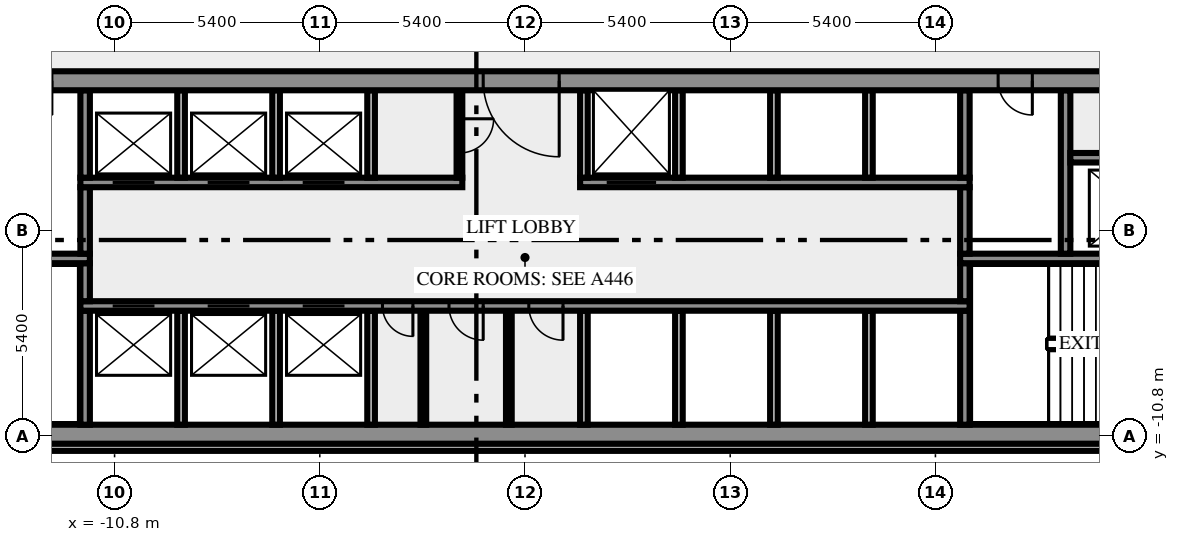
"""IFC4 building model, lengths in metres.
Left out: names, types, materials, properties, quantities, classifications, styles, units other than length and angle.
Written with IfcOpenShell. Run it as: python <this file> out.ifc"""

import sys

from ifc_helpers import new_model, si_unit, direction, frame, frame_2d, origin, place, context, subcontext, project, spatial, rectangle, extrude, element, fill, save


model = new_model("IFC4")
c1 = context("Model", 3, precision=1e-05, world=origin(), true_north=direction((0.0, 1.0)))
c2 = subcontext(c1, "Body", "Model", "MODEL_VIEW")
j1 = project(units=[si_unit("LENGTHUNIT", "METRE"), si_unit("PLANEANGLEUNIT", "RADIAN")], contexts=[c1])
p1 = place(None, origin())
s1 = spatial("IfcSite", under=j1, at=p1, CompositionType="ELEMENT")
p2 = place(p1, origin())
s2 = spatial("IfcBuilding", under=s1, at=p2, CompositionType="ELEMENT")
p3 = place(p2, frame((0.0, 0.0, 6.0)))
s3 = spatial("IfcBuildingStorey", under=s2, at=p3, CompositionType="ELEMENT", Elevation=6.0)
p4 = place(p3, frame((-17.444, -11.088, 0.0), z_axis=(0.0, 0.0, 1.0), x_axis=(1.0, 0.0, 0.0)))
e1 = element("IfcWall", 1, at=p4, inside=s3, PredefinedType="SOLIDWALL", context=c2, shape_type="SweptSolid", body=[
    extrude(rectangle(XDim=34.888, YDim=0.2, at=frame_2d((17.444, 0.0))), origin(), (0.0, 0.0, 1.0), 5.1),
])
p5 = place(p3, frame((-20.0, -10.75, 0.0), z_axis=(0.0, 0.0, 1.0), x_axis=(1.0, 0.0, 0.0)))
e2 = element("IfcWall", 2, at=p5, inside=s3, PredefinedType="SHEAR", context=c2, shape_type="SweptSolid", body=[
    extrude(rectangle(XDim=40.0, YDim=0.5, at=frame_2d((20.0, 0.0))), origin(), (0.0, 0.0, 1.0), 5.1),
])
p6 = place(p5, frame((0.8, 0.0, 1.0)))
e3 = element("IfcOpeningElement", 3, at=p6, cuts=e2, PredefinedType="OPENING", context=c2, shape_type="SweptSolid", body=[
    extrude(rectangle(XDim=1.2, YDim=1.2, at=frame_2d((0.6, 0.6))), frame((0.0, 0.26, 0.0), z_axis=(0.0, -1.0, 0.0), x_axis=(1.0, 0.0, 0.0)), (0.0, 0.0, 1.0), 0.52),
])
p7 = place(p5, frame((38.0, 0.0, 1.0)))
e4 = element("IfcOpeningElement", 4, at=p7, cuts=e2, PredefinedType="OPENING", context=c2, shape_type="SweptSolid", body=[
    extrude(rectangle(XDim=1.2, YDim=1.2, at=frame_2d((0.6, 0.6))), frame((0.0, 0.26, 0.0), z_axis=(0.0, -1.0, 0.0), x_axis=(1.0, 0.0, 0.0)), (0.0, 0.0, 1.0), 0.52),
])
p8 = place(p3, frame((-11.575, -10.5, 0.0), z_axis=(0.0, 0.0, 1.0), x_axis=(0.0, 1.0, 0.0)))
e5 = element("IfcWall", 5, at=p8, inside=s3, PredefinedType="SHEAR", context=c2, shape_type="SweptSolid", body=[
    extrude(rectangle(XDim=3.0, YDim=0.25, at=frame_2d((1.5, 0.0))), origin(), (0.0, 0.0, 1.0), 5.1),
])
for number, where, z_axis, x_axis in (
    (6, (-9.05, -10.5, 0.0), (0.0, 0.0, 1.0), (0.0, 1.0, 0.0)),
    (7, (-6.55, -10.5, 0.0), (0.0, 0.0, 1.0), (0.0, 1.0, 0.0)),
    (8, (-4.05, -10.5, 0.0), (0.0, 0.0, 1.0), (0.0, 1.0, 0.0)),
):
    element("IfcWall", number, at=place(p3, frame(where, z_axis=z_axis, x_axis=x_axis)), inside=s3, PredefinedType="SOLIDWALL", context=c2, shape_type="SweptSolid", body=[
        extrude(rectangle(XDim=3.0, YDim=0.2, at=frame_2d((1.5, 0.0))), origin(), (0.0, 0.0, 1.0), 5.1),
    ])
for number, where, z_axis, x_axis in (
    (9, (-2.675, -10.5, 0.0), (0.0, 0.0, 1.0), (0.0, 1.0, 0.0)),
    (10, (-0.425, -10.5, 0.0), (0.0, 0.0, 1.0), (0.0, 1.0, 0.0)),
):
    element("IfcWall", number, at=place(p3, frame(where, z_axis=z_axis, x_axis=x_axis)), inside=s3, PredefinedType="PARTITIONING", context=c2, shape_type="SweptSolid", body=[
        extrude(rectangle(XDim=3.0, YDim=0.15, at=frame_2d((1.5, 0.0))), origin(), (0.0, 0.0, 1.0), 5.1),
    ])
for number, where, z_axis, x_axis in (
    (11, (1.55, -10.5, 0.0), (0.0, 0.0, 1.0), (0.0, 1.0, 0.0)),
    (12, (4.05, -10.5, 0.0), (0.0, 0.0, 1.0), (0.0, 1.0, 0.0)),
    (13, (6.55, -10.5, 0.0), (0.0, 0.0, 1.0), (0.0, 1.0, 0.0)),
    (14, (9.05, -10.5, 0.0), (0.0, 0.0, 1.0), (0.0, 1.0, 0.0)),
):
    element("IfcWall", number, at=place(p3, frame(where, z_axis=z_axis, x_axis=x_axis)), inside=s3, PredefinedType="SOLIDWALL", context=c2, shape_type="SweptSolid", body=[
        extrude(rectangle(XDim=3.0, YDim=0.2, at=frame_2d((1.5, 0.0))), origin(), (0.0, 0.0, 1.0), 5.1),
    ])
p9 = place(p3, frame((11.575, -10.5, 0.0), z_axis=(0.0, 0.0, 1.0), x_axis=(0.0, 1.0, 0.0)))
e15 = element("IfcWall", 15, at=p9, inside=s3, PredefinedType="SHEAR", context=c2, shape_type="SweptSolid", body=[
    extrude(rectangle(XDim=3.0, YDim=0.25, at=frame_2d((1.5, 0.0))), origin(), (0.0, 0.0, 1.0), 5.1),
])
p10 = place(p3, frame((11.7, -7.375, 0.0), z_axis=(0.0, 0.0, 1.0), x_axis=(-1.0, 0.0, 0.0)))
e16 = element("IfcWall", 16, at=p10, inside=s3, PredefinedType="SHEAR", context=c2, shape_type="SweptSolid", body=[
    extrude(rectangle(XDim=23.4, YDim=0.25, at=frame_2d((11.7, 0.0))), origin(), (0.0, 0.0, 1.0), 5.1),
])
p11 = place(p10, frame((21.45, 0.0, 0.0)))
e17 = element("IfcOpeningElement", 17, at=p11, cuts=e16, PredefinedType="OPENING", context=c2, shape_type="SweptSolid", body=[
    extrude(rectangle(XDim=1.1, YDim=2.1, at=frame_2d((0.55, 1.05))), frame((0.0, 0.135, 0.0), z_axis=(0.0, -1.0, 0.0), x_axis=(1.0, 0.0, 0.0)), (0.0, 0.0, 1.0), 0.27),
])
p12 = place(p10, frame((18.95, 0.0, 0.0)))
e18 = element("IfcOpeningElement", 18, at=p12, cuts=e16, PredefinedType="OPENING", context=c2, shape_type="SweptSolid", body=[
    extrude(rectangle(XDim=1.1, YDim=2.1, at=frame_2d((0.55, 1.05))), frame((0.0, 0.135, 0.0), z_axis=(0.0, -1.0, 0.0), x_axis=(1.0, 0.0, 0.0)), (0.0, 0.0, 1.0), 0.27),
])
p13 = place(p10, frame((16.45, 0.0, 0.0)))
e19 = element("IfcOpeningElement", 19, at=p13, cuts=e16, PredefinedType="OPENING", context=c2, shape_type="SweptSolid", body=[
    extrude(rectangle(XDim=1.1, YDim=2.1, at=frame_2d((0.55, 1.05))), frame((0.0, 0.135, 0.0), z_axis=(0.0, -1.0, 0.0), x_axis=(1.0, 0.0, 0.0)), (0.0, 0.0, 1.0), 0.27),
])
p14 = place(p10, frame((14.65, 0.0, 0.0)))
e20 = element("IfcOpeningElement", 20, at=p14, cuts=e16, PredefinedType="OPENING", context=c2, shape_type="SweptSolid", body=[
    extrude(rectangle(XDim=0.8, YDim=2.1, at=frame_2d((0.4, 1.05))), frame((0.0, 0.135, 0.0), z_axis=(0.0, -1.0, 0.0), x_axis=(1.0, 0.0, 0.0)), (0.0, 0.0, 1.0), 0.27),
])
p15 = place(p10, frame((12.8, 0.0, 0.0)))
e21 = element("IfcOpeningElement", 21, at=p15, cuts=e16, PredefinedType="OPENING", context=c2, shape_type="SweptSolid", body=[
    extrude(rectangle(XDim=0.9, YDim=2.1, at=frame_2d((0.45, 1.05))), frame((0.0, 0.135, 0.0), z_axis=(0.0, -1.0, 0.0), x_axis=(1.0, 0.0, 0.0)), (0.0, 0.0, 1.0), 0.27),
])
p16 = place(p10, frame((10.7, 0.0, 0.0)))
e22 = element("IfcOpeningElement", 22, at=p16, cuts=e16, PredefinedType="OPENING", context=c2, shape_type="SweptSolid", body=[
    extrude(rectangle(XDim=0.9, YDim=2.1, at=frame_2d((0.45, 1.05))), frame((0.0, 0.135, 0.0), z_axis=(0.0, -1.0, 0.0), x_axis=(1.0, 0.0, 0.0)), (0.0, 0.0, 1.0), 0.27),
])
for number, where, z_axis, x_axis in (
    (23, (-11.575, -7.25, 0.0), (0.0, 0.0, 1.0), (0.0, 1.0, 0.0)),
    (24, (11.575, -7.25, 0.0), (0.0, 0.0, 1.0), (0.0, 1.0, 0.0)),
):
    element("IfcWall", number, at=place(p3, frame(where, z_axis=z_axis, x_axis=x_axis)), inside=s3, PredefinedType="SHEAR", context=c2, shape_type="SweptSolid", body=[
        extrude(rectangle(XDim=1.0, YDim=0.25, at=frame_2d((0.5, 0.0))), origin(), (0.0, 0.0, 1.0), 5.1),
    ])
p17 = place(p3, frame((-11.45, -6.125, 0.0), z_axis=(0.0, 0.0, 1.0), x_axis=(-1.0, 0.0, 0.0)))
e25 = element("IfcWall", 25, at=p17, inside=s3, PredefinedType="SHEAR", context=c2, shape_type="SweptSolid", body=[
    extrude(rectangle(XDim=8.05, YDim=0.25, at=frame_2d((4.025, 0.0))), origin(), (0.0, 0.0, 1.0), 5.1),
])
p18 = place(p17, frame((6.2, 0.0, 0.0)))
e26 = element("IfcOpeningElement", 26, at=p18, cuts=e25, PredefinedType="OPENING", context=c2, shape_type="SweptSolid", body=[
    extrude(rectangle(XDim=1.8, YDim=2.1, at=frame_2d((0.9, 1.05))), frame((0.0, 0.135, 0.0), z_axis=(0.0, -1.0, 0.0), x_axis=(1.0, 0.0, 0.0)), (0.0, 0.0, 1.0), 0.27),
])
p19 = place(p3, frame((19.5, -6.125, 0.0), z_axis=(0.0, 0.0, 1.0), x_axis=(-1.0, 0.0, 0.0)))
e27 = element("IfcWall", 27, at=p19, inside=s3, PredefinedType="SHEAR", context=c2, shape_type="SweptSolid", body=[
    extrude(rectangle(XDim=8.05, YDim=0.25, at=frame_2d((4.025, 0.0))), origin(), (0.0, 0.0, 1.0), 5.1),
])
p20 = place(p19, frame((0.05, 0.0, 0.0)))
e28 = element("IfcOpeningElement", 28, at=p20, cuts=e27, PredefinedType="OPENING", context=c2, shape_type="SweptSolid", body=[
    extrude(rectangle(XDim=1.8, YDim=2.1, at=frame_2d((0.9, 1.05))), frame((0.0, 0.135, 0.0), z_axis=(0.0, -1.0, 0.0), x_axis=(1.0, 0.0, 0.0)), (0.0, 0.0, 1.0), 0.27),
])
for number, where, z_axis, x_axis in (
    (29, (-11.575, -6.0, 0.0), (0.0, 0.0, 1.0), (0.0, 1.0, 0.0)),
    (30, (11.575, -6.0, 0.0), (0.0, 0.0, 1.0), (0.0, 1.0, 0.0)),
):
    element("IfcWall", number, at=place(p3, frame(where, z_axis=z_axis, x_axis=x_axis)), inside=s3, PredefinedType="SHEAR", context=c2, shape_type="SweptSolid", body=[
        extrude(rectangle(XDim=1.75, YDim=0.25, at=frame_2d((0.875, 0.0))), origin(), (0.0, 0.0, 1.0), 5.1),
    ])
p21 = place(p3, frame((14.225, -6.0, 0.0), z_axis=(0.0, 0.0, 1.0), x_axis=(0.0, 1.0, 0.0)))
e31 = element("IfcWall", 31, at=p21, inside=s3, PredefinedType="SHEAR", context=c2, shape_type="SweptSolid", body=[
    extrude(rectangle(XDim=4.3, YDim=0.25, at=frame_2d((2.15, 0.0))), origin(), (0.0, 0.0, 1.0), 5.1),
])
p22 = place(p3, frame((-11.7, -4.125, 0.0), z_axis=(0.0, 0.0, 1.0), x_axis=(1.0, 0.0, 0.0)))
e32 = element("IfcWall", 32, at=p22, inside=s3, PredefinedType="SHEAR", context=c2, shape_type="SweptSolid", body=[
    extrude(rectangle(XDim=10.05, YDim=0.25, at=frame_2d((5.025, 0.0))), origin(), (0.0, 0.0, 1.0), 5.1),
])
p23 = place(p22, frame((0.85, 0.0, 0.0)))
e33 = element("IfcOpeningElement", 33, at=p23, cuts=e32, PredefinedType="OPENING", context=c2, shape_type="SweptSolid", body=[
    extrude(rectangle(XDim=1.1, YDim=2.1, at=frame_2d((0.55, 1.05))), frame((0.0, 0.135, 0.0), z_axis=(0.0, -1.0, 0.0), x_axis=(1.0, 0.0, 0.0)), (0.0, 0.0, 1.0), 0.27),
])
p24 = place(p22, frame((3.35, 0.0, 0.0)))
e34 = element("IfcOpeningElement", 34, at=p24, cuts=e32, PredefinedType="OPENING", context=c2, shape_type="SweptSolid", body=[
    extrude(rectangle(XDim=1.1, YDim=2.1, at=frame_2d((0.55, 1.05))), frame((0.0, 0.135, 0.0), z_axis=(0.0, -1.0, 0.0), x_axis=(1.0, 0.0, 0.0)), (0.0, 0.0, 1.0), 0.27),
])
p25 = place(p22, frame((5.85, 0.0, 0.0)))
e35 = element("IfcOpeningElement", 35, at=p25, cuts=e32, PredefinedType="OPENING", context=c2, shape_type="SweptSolid", body=[
    extrude(rectangle(XDim=1.1, YDim=2.1, at=frame_2d((0.55, 1.05))), frame((0.0, 0.135, 0.0), z_axis=(0.0, -1.0, 0.0), x_axis=(1.0, 0.0, 0.0)), (0.0, 0.0, 1.0), 0.27),
])
p26 = place(p3, frame((1.45, -4.125, 0.0), z_axis=(0.0, 0.0, 1.0), x_axis=(1.0, 0.0, 0.0)))
e36 = element("IfcWall", 36, at=p26, inside=s3, PredefinedType="SHEAR", context=c2, shape_type="SweptSolid", body=[
    extrude(rectangle(XDim=10.25, YDim=0.25, at=frame_2d((5.125, 0.0))), origin(), (0.0, 0.0, 1.0), 5.1),
])
p27 = place(p26, frame((0.7, 0.0, 0.0)))
e37 = element("IfcOpeningElement", 37, at=p27, cuts=e36, PredefinedType="OPENING", context=c2, shape_type="SweptSolid", body=[
    extrude(rectangle(XDim=1.3, YDim=2.1, at=frame_2d((0.65, 1.05))), frame((0.0, 0.135, 0.0), z_axis=(0.0, -1.0, 0.0), x_axis=(1.0, 0.0, 0.0)), (0.0, 0.0, 1.0), 0.27),
])
p28 = place(p3, frame((-11.575, -4.0, 0.0), z_axis=(0.0, 0.0, 1.0), x_axis=(0.0, 1.0, 0.0)))
e38 = element("IfcWall", 38, at=p28, inside=s3, PredefinedType="SHEAR", context=c2, shape_type="SweptSolid", body=[
    extrude(rectangle(XDim=2.3, YDim=0.25, at=frame_2d((1.15, 0.0))), origin(), (0.0, 0.0, 1.0), 5.1),
])
for number, where, z_axis, x_axis in (
    (39, (-9.05, -4.0, 0.0), (0.0, 0.0, 1.0), (0.0, 1.0, 0.0)),
    (40, (-6.55, -4.0, 0.0), (0.0, 0.0, 1.0), (0.0, 1.0, 0.0)),
    (41, (-4.05, -4.0, 0.0), (0.0, 0.0, 1.0), (0.0, 1.0, 0.0)),
):
    element("IfcWall", number, at=place(p3, frame(where, z_axis=z_axis, x_axis=x_axis)), inside=s3, PredefinedType="SOLIDWALL", context=c2, shape_type="SweptSolid", body=[
        extrude(rectangle(XDim=2.3, YDim=0.2, at=frame_2d((1.15, 0.0))), origin(), (0.0, 0.0, 1.0), 5.1),
    ])
p29 = place(p3, frame((-1.725, -1.7, 0.0), z_axis=(0.0, 0.0, 1.0), x_axis=(0.0, -1.0, 0.0)))
e42 = element("IfcWall", 42, at=p29, inside=s3, PredefinedType="PARTITIONING", context=c2, shape_type="SweptSolid", body=[
    extrude(rectangle(XDim=2.3, YDim=0.15, at=frame_2d((1.15, 0.0))), origin(), (0.0, 0.0, 1.0), 5.1),
])
p30 = place(p29, frame((0.75, 0.0, 0.0)))
e43 = element("IfcOpeningElement", 43, at=p30, cuts=e42, PredefinedType="OPENING", context=c2, shape_type="SweptSolid", body=[
    extrude(rectangle(XDim=0.9, YDim=2.1, at=frame_2d((0.45, 1.05))), frame((0.0, 0.085, 0.0), z_axis=(0.0, -1.0, 0.0), x_axis=(1.0, 0.0, 0.0)), (0.0, 0.0, 1.0), 0.17),
])
for number, where, z_axis, x_axis in (
    (44, (1.55, -4.0, 0.0), (0.0, 0.0, 1.0), (0.0, 1.0, 0.0)),
    (45, (4.05, -4.0, 0.0), (0.0, 0.0, 1.0), (0.0, 1.0, 0.0)),
    (46, (6.55, -4.0, 0.0), (0.0, 0.0, 1.0), (0.0, 1.0, 0.0)),
    (47, (9.05, -4.0, 0.0), (0.0, 0.0, 1.0), (0.0, 1.0, 0.0)),
):
    element("IfcWall", number, at=place(p3, frame(where, z_axis=z_axis, x_axis=x_axis)), inside=s3, PredefinedType="SOLIDWALL", context=c2, shape_type="SweptSolid", body=[
        extrude(rectangle(XDim=2.3, YDim=0.2, at=frame_2d((1.15, 0.0))), origin(), (0.0, 0.0, 1.0), 5.1),
    ])
p31 = place(p3, frame((11.575, -4.0, 0.0), z_axis=(0.0, 0.0, 1.0), x_axis=(0.0, 1.0, 0.0)))
e48 = element("IfcWall", 48, at=p31, inside=s3, PredefinedType="SHEAR", context=c2, shape_type="SweptSolid", body=[
    extrude(rectangle(XDim=2.3, YDim=0.25, at=frame_2d((1.15, 0.0))), origin(), (0.0, 0.0, 1.0), 5.1),
])
p32 = place(p3, frame((14.35, -3.475, 0.0), z_axis=(0.0, 0.0, 1.0), x_axis=(1.0, 0.0, 0.0)))
e49 = element("IfcWall", 49, at=p32, inside=s3, PredefinedType="SHEAR", context=c2, shape_type="SweptSolid", body=[
    extrude(rectangle(XDim=3.0, YDim=0.25, at=frame_2d((1.5, 0.0))), origin(), (0.0, 0.0, 1.0), 5.1),
])
p33 = place(p3, frame((20.49, -1.45, 0.0), z_axis=(0.0, 0.0, 1.0), x_axis=(-1.0, 0.0, 0.0)))
e50 = element("IfcWall", 50, at=p33, inside=s3, PredefinedType="SHEAR", context=c2, shape_type="SweptSolid", body=[
    extrude(rectangle(XDim=40.98, YDim=0.5, at=frame_2d((20.49, 0.0))), origin(), (0.0, 0.0, 1.0), 5.1),
])
p34 = place(p33, frame((38.14, 0.0, 0.0)))
e51 = element("IfcOpeningElement", 51, at=p34, cuts=e50, PredefinedType="OPENING", context=c2, shape_type="SweptSolid", body=[
    extrude(rectangle(XDim=1.8, YDim=2.1, at=frame_2d((0.9, 1.05))), frame((0.0, 0.26, 0.0), z_axis=(0.0, -1.0, 0.0), x_axis=(1.0, 0.0, 0.0)), (0.0, 0.0, 1.0), 0.52),
])
p35 = place(p33, frame((36.728, 0.0, 0.0)))
e52 = element("IfcOpeningElement", 52, at=p35, cuts=e50, PredefinedType="OPENING", context=c2, shape_type="SweptSolid", body=[
    extrude(rectangle(XDim=0.8, YDim=2.1, at=frame_2d((0.4, 1.05))), frame((0.0, 0.26, 0.0), z_axis=(0.0, -1.0, 0.0), x_axis=(1.0, 0.0, 0.0)), (0.0, 0.0, 1.0), 0.52),
])
p36 = place(p33, frame((35.153, 0.0, 0.0)))
e53 = element("IfcOpeningElement", 53, at=p36, cuts=e50, PredefinedType="OPENING", context=c2, shape_type="SweptSolid", body=[
    extrude(rectangle(XDim=0.8, YDim=2.1, at=frame_2d((0.4, 1.05))), frame((0.0, 0.26, 0.0), z_axis=(0.0, -1.0, 0.0), x_axis=(1.0, 0.0, 0.0)), (0.0, 0.0, 1.0), 0.52),
])
p37 = place(p33, frame((32.94, 0.0, 0.0)))
e54 = element("IfcOpeningElement", 54, at=p37, cuts=e50, PredefinedType="OPENING", context=c2, shape_type="SweptSolid", body=[
    extrude(rectangle(XDim=0.9, YDim=2.1, at=frame_2d((0.45, 1.05))), frame((0.0, 0.26, 0.0), z_axis=(0.0, -1.0, 0.0), x_axis=(1.0, 0.0, 0.0)), (0.0, 0.0, 1.0), 0.52),
])
p38 = place(p33, frame((19.59, 0.0, 0.0)))
e55 = element("IfcOpeningElement", 55, at=p38, cuts=e50, PredefinedType="OPENING", context=c2, shape_type="SweptSolid", body=[
    extrude(rectangle(XDim=2.0, YDim=2.1, at=frame_2d((1.0, 1.05))), frame((0.0, 0.26, 0.0), z_axis=(0.0, -1.0, 0.0), x_axis=(1.0, 0.0, 0.0)), (0.0, 0.0, 1.0), 0.52),
])
p39 = place(p33, frame((7.14, 0.0, 0.0)))
e56 = element("IfcOpeningElement", 56, at=p39, cuts=e50, PredefinedType="OPENING", context=c2, shape_type="SweptSolid", body=[
    extrude(rectangle(XDim=0.9, YDim=2.1, at=frame_2d((0.45, 1.05))), frame((0.0, 0.26, 0.0), z_axis=(0.0, -1.0, 0.0), x_axis=(1.0, 0.0, 0.0)), (0.0, 0.0, 1.0), 0.52),
])
p40 = place(p33, frame((4.19, 0.0, 0.0)))
e57 = element("IfcOpeningElement", 57, at=p40, cuts=e50, PredefinedType="OPENING", context=c2, shape_type="SweptSolid", body=[
    extrude(rectangle(XDim=0.9, YDim=2.1, at=frame_2d((0.45, 1.05))), frame((0.0, 0.26, 0.0), z_axis=(0.0, -1.0, 0.0), x_axis=(1.0, 0.0, 0.0)), (0.0, 0.0, 1.0), 0.52),
])
p41 = place(p33, frame((1.04, 0.0, 0.0)))
e58 = element("IfcOpeningElement", 58, at=p41, cuts=e50, PredefinedType="OPENING", context=c2, shape_type="SweptSolid", body=[
    extrude(rectangle(XDim=1.8, YDim=2.1, at=frame_2d((0.9, 1.05))), frame((0.0, 0.26, 0.0), z_axis=(0.0, -1.0, 0.0), x_axis=(1.0, 0.0, 0.0)), (0.0, 0.0, 1.0), 0.52),
])
p42 = place(p11, origin())
e59 = element("IfcDoor", 59, at=p42, inside=s3, OperationType="DOUBLE_DOOR_SLIDING", PredefinedType="DOOR", context=c2, shape_type="SweptSolid", body=[
    extrude(rectangle(XDim=1.1, YDim=2.1, at=frame_2d((0.55, 1.05))), frame((0.0, 0.025, 0.0), z_axis=(0.0, -1.0, 0.0), x_axis=(1.0, 0.0, 0.0)), (0.0, 0.0, 1.0), 0.05),
])
fill(e17, e59)
p43 = place(p12, origin())
e60 = element("IfcDoor", 60, at=p43, inside=s3, OperationType="DOUBLE_DOOR_SLIDING", PredefinedType="DOOR", context=c2, shape_type="SweptSolid", body=[
    extrude(rectangle(XDim=1.1, YDim=2.1, at=frame_2d((0.55, 1.05))), frame((0.0, 0.025, 0.0), z_axis=(0.0, -1.0, 0.0), x_axis=(1.0, 0.0, 0.0)), (0.0, 0.0, 1.0), 0.05),
])
fill(e18, e60)
p44 = place(p13, origin())
e61 = element("IfcDoor", 61, at=p44, inside=s3, OperationType="DOUBLE_DOOR_SLIDING", PredefinedType="DOOR", context=c2, shape_type="SweptSolid", body=[
    extrude(rectangle(XDim=1.1, YDim=2.1, at=frame_2d((0.55, 1.05))), frame((0.0, 0.025, 0.0), z_axis=(0.0, -1.0, 0.0), x_axis=(1.0, 0.0, 0.0)), (0.0, 0.0, 1.0), 0.05),
])
fill(e19, e61)
p45 = place(p14, origin())
e62 = element("IfcDoor", 62, at=p45, inside=s3, OperationType="SINGLE_SWING_RIGHT", PredefinedType="DOOR", context=c2, shape_type="SweptSolid", body=[
    extrude(rectangle(XDim=0.8, YDim=2.1, at=frame_2d((0.4, 1.05))), frame((0.0, 0.025, 0.0), z_axis=(0.0, -1.0, 0.0), x_axis=(1.0, 0.0, 0.0)), (0.0, 0.0, 1.0), 0.05),
])
fill(e20, e62)
p46 = place(p15, origin())
e63 = element("IfcDoor", 63, at=p46, inside=s3, OperationType="SINGLE_SWING_RIGHT", PredefinedType="DOOR", context=c2, shape_type="SweptSolid", body=[
    extrude(rectangle(XDim=0.9, YDim=2.1, at=frame_2d((0.45, 1.05))), frame((0.0, 0.025, 0.0), z_axis=(0.0, -1.0, 0.0), x_axis=(1.0, 0.0, 0.0)), (0.0, 0.0, 1.0), 0.05),
])
fill(e21, e63)
p47 = place(p16, origin())
e64 = element("IfcDoor", 64, at=p47, inside=s3, OperationType="SINGLE_SWING_LEFT", PredefinedType="DOOR", context=c2, shape_type="SweptSolid", body=[
    extrude(rectangle(XDim=0.9, YDim=2.1, at=frame_2d((0.45, 1.05))), frame((0.0, 0.025, 0.0), z_axis=(0.0, -1.0, 0.0), x_axis=(1.0, 0.0, 0.0)), (0.0, 0.0, 1.0), 0.05),
])
fill(e22, e64)
p48 = place(p23, origin())
e65 = element("IfcDoor", 65, at=p48, inside=s3, OperationType="DOUBLE_DOOR_SLIDING", PredefinedType="DOOR", context=c2, shape_type="SweptSolid", body=[
    extrude(rectangle(XDim=1.1, YDim=2.1, at=frame_2d((0.55, 1.05))), frame((0.0, 0.025, 0.0), z_axis=(0.0, -1.0, 0.0), x_axis=(1.0, 0.0, 0.0)), (0.0, 0.0, 1.0), 0.05),
])
fill(e33, e65)
p49 = place(p24, origin())
e66 = element("IfcDoor", 66, at=p49, inside=s3, OperationType="DOUBLE_DOOR_SLIDING", PredefinedType="DOOR", context=c2, shape_type="SweptSolid", body=[
    extrude(rectangle(XDim=1.1, YDim=2.1, at=frame_2d((0.55, 1.05))), frame((0.0, 0.025, 0.0), z_axis=(0.0, -1.0, 0.0), x_axis=(1.0, 0.0, 0.0)), (0.0, 0.0, 1.0), 0.05),
])
fill(e34, e66)
p50 = place(p25, origin())
e67 = element("IfcDoor", 67, at=p50, inside=s3, OperationType="DOUBLE_DOOR_SLIDING", PredefinedType="DOOR", context=c2, shape_type="SweptSolid", body=[
    extrude(rectangle(XDim=1.1, YDim=2.1, at=frame_2d((0.55, 1.05))), frame((0.0, 0.025, 0.0), z_axis=(0.0, -1.0, 0.0), x_axis=(1.0, 0.0, 0.0)), (0.0, 0.0, 1.0), 0.05),
])
fill(e35, e67)
p51 = place(p27, origin())
e68 = element("IfcDoor", 68, at=p51, inside=s3, OperationType="DOUBLE_DOOR_SLIDING", PredefinedType="DOOR", context=c2, shape_type="SweptSolid", body=[
    extrude(rectangle(XDim=1.3, YDim=2.1, at=frame_2d((0.65, 1.05))), frame((0.0, 0.025, 0.0), z_axis=(0.0, -1.0, 0.0), x_axis=(1.0, 0.0, 0.0)), (0.0, 0.0, 1.0), 0.05),
])
fill(e37, e68)
p52 = place(p30, origin())
e69 = element("IfcDoor", 69, at=p52, inside=s3, OperationType="SINGLE_SWING_RIGHT", PredefinedType="DOOR", context=c2, shape_type="SweptSolid", body=[
    extrude(rectangle(XDim=0.9, YDim=2.1, at=frame_2d((0.45, 1.05))), frame((0.0, 0.025, 0.0), z_axis=(0.0, -1.0, 0.0), x_axis=(1.0, 0.0, 0.0)), (0.0, 0.0, 1.0), 0.05),
])
fill(e43, e69)
p53 = place(p38, origin())
e70 = element("IfcDoor", 70, at=p53, inside=s3, OperationType="DOUBLE_DOOR_SINGLE_SWING", PredefinedType="DOOR", context=c2, shape_type="SweptSolid", body=[
    extrude(rectangle(XDim=2.0, YDim=2.1, at=frame_2d((1.0, 1.05))), frame((0.0, 0.025, 0.0), z_axis=(0.0, -1.0, 0.0), x_axis=(1.0, 0.0, 0.0)), (0.0, 0.0, 1.0), 0.05),
])
fill(e55, e70)
p54 = place(p39, origin())
e71 = element("IfcDoor", 71, at=p54, inside=s3, OperationType="SINGLE_SWING_LEFT", PredefinedType="DOOR", context=c2, shape_type="SweptSolid", body=[
    extrude(rectangle(XDim=0.9, YDim=2.1, at=frame_2d((0.45, 1.05))), frame((0.0, 0.025, 0.0), z_axis=(0.0, -1.0, 0.0), x_axis=(1.0, 0.0, 0.0)), (0.0, 0.0, 1.0), 0.05),
])
fill(e56, e71)
save(model, sys.argv[1])
